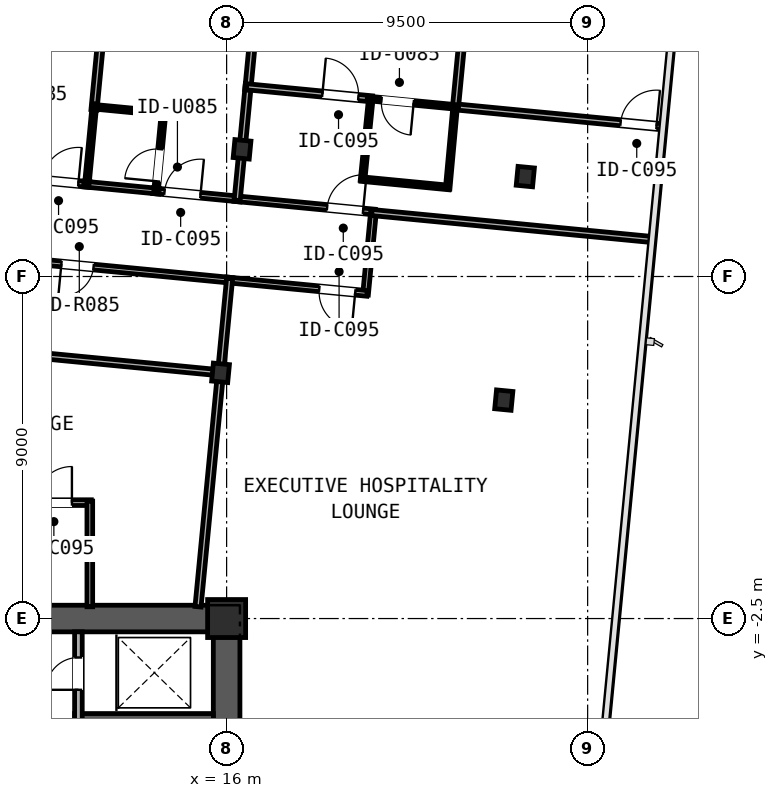
"""IFC4 building model, lengths in metres.
Left out: names, types, materials, properties, quantities, classifications, styles, units other than length and angle.
Written with IfcOpenShell. Run it as: python <this file> out.ifc"""

import sys

from ifc_helpers import new_model, si_unit, direction, frame, frame_2d, origin, origin_2d, place, context, subcontext, project, spatial, rectangle, i_section, extrude, element, fill, save


model = new_model("IFC4")
c1 = context("Model", 3, precision=1e-05, world=origin(), true_north=direction((0.0, 1.0)))
c2 = subcontext(c1, "Body", "Model", "MODEL_VIEW")
j1 = project(units=[si_unit("LENGTHUNIT", "METRE"), si_unit("PLANEANGLEUNIT", "RADIAN")], contexts=[c1])
p1 = place(None, origin())
s1 = spatial("IfcSite", under=j1, at=p1, CompositionType="ELEMENT")
p2 = place(p1, origin())
s2 = spatial("IfcBuilding", under=s1, at=p2, CompositionType="ELEMENT")
p3 = place(p2, frame((0.0, 0.0, 146.25)))
s3 = spatial("IfcBuildingStorey", under=s2, at=p3, CompositionType="ELEMENT", Elevation=146.25)
p4 = place(p3, frame((-16.35, -2.5, 0.0), z_axis=(0.0, 0.0, 1.0), x_axis=(1.0, 0.0, 0.0)))
e1 = element("IfcWall", 1, at=p4, inside=s3, PredefinedType="SHEAR", context=c2, shape_type="SweptSolid", body=[
    extrude(rectangle(XDim=32.7, YDim=0.7, at=frame_2d((16.35, 0.0))), origin(), (0.0, 0.0, 1.0), 2.91),
])
p5 = place(p4, frame((5.975, 0.0, 0.0)))
e2 = element("IfcOpeningElement", 2, at=p5, cuts=e1, PredefinedType="OPENING", context=c2, shape_type="SweptSolid", body=[
    extrude(rectangle(XDim=1.15, YDim=2.0, at=frame_2d((0.575, 1.0))), frame((0.0, 0.36, 0.0), z_axis=(0.0, -1.0, 0.0), x_axis=(1.0, 0.0, 0.0)), (0.0, 0.0, 1.0), 0.72),
])
p6 = place(p4, frame((15.55, 0.0, 0.0)))
e3 = element("IfcOpeningElement", 3, at=p6, cuts=e1, PredefinedType="OPENING", context=c2, shape_type="SweptSolid", body=[
    extrude(rectangle(XDim=1.6, YDim=2.0, at=frame_2d((0.8, 1.0))), frame((0.0, 0.36, 0.0), z_axis=(0.0, -1.0, 0.0), x_axis=(1.0, 0.0, 0.0)), (0.0, 0.0, 1.0), 0.72),
])
p7 = place(p4, frame((25.575, 0.0, 0.0)))
e4 = element("IfcOpeningElement", 4, at=p7, cuts=e1, PredefinedType="OPENING", context=c2, shape_type="SweptSolid", body=[
    extrude(rectangle(XDim=1.15, YDim=2.0, at=frame_2d((0.575, 1.0))), frame((0.0, 0.36, 0.0), z_axis=(0.0, -1.0, 0.0), x_axis=(1.0, 0.0, 0.0)), (0.0, 0.0, 1.0), 0.72),
])
p8 = place(p3, frame((16.0, -12.65, 0.0), z_axis=(0.0, 0.0, 1.0), x_axis=(0.0, 1.0, 0.0)))
e5 = element("IfcWall", 5, at=p8, inside=s3, PredefinedType="SHEAR", context=c2, shape_type="SweptSolid", body=[
    extrude(rectangle(XDim=9.8, YDim=0.7, at=frame_2d((4.9, 0.0))), origin(), (0.0, 0.0, 1.0), 2.91),
])
p9 = place(p3, frame((12.0, -5.1, 0.0), z_axis=(0.0, 0.0, 1.0), x_axis=(1.0, 0.0, 0.0)))
e6 = element("IfcWall", 6, at=p9, inside=s3, PredefinedType="SOLIDWALL", context=c2, shape_type="SweptSolid", body=[
    extrude(rectangle(XDim=3.65, YDim=0.2, at=frame_2d((1.825, 0.0))), origin(), (0.0, 0.0, 1.0), 3.19),
])
p10 = place(p3, frame((16.0, -2.5, 0.0), z_axis=(0.0, 0.0, 1.0), x_axis=(1.0, 0.0, 0.0)))
e7 = element("IfcColumn", 7, at=p10, inside=s3, PredefinedType="COLUMN", context=c2, shape_type="SweptSolid", body=[
    extrude(rectangle(XDim=1.0, YDim=1.0, at=origin_2d()), origin(), (0.0, 0.0, 1.0), 3.45),
])
for number, where, z_axis, x_axis in (
    (8, (15.84, 3.965, 0.0), (0.0, 0.0, 1.0), (0.995, -0.096, 0.0)),
    (9, (16.406, 9.846, 0.0), (0.0, 0.0, 1.0), (0.995, -0.096, 0.0)),
):
    element("IfcColumn", number, at=place(p3, frame(where, z_axis=z_axis, x_axis=x_axis)), inside=s3, PredefinedType="COLUMN", context=c2, shape_type="SweptSolid", body=[
        extrude(i_section(OverallWidth=0.424, OverallDepth=0.474, WebThickness=0.048, FlangeThickness=0.077, FilletRadius=0.031, at=origin_2d()), origin(), (0.0, 0.0, 1.0), 3.45),
    ])
for number, where, z_axis, x_axis in (
    (10, (23.293, 3.248, 0.0), (0.0, 0.0, 1.0), (0.995, -0.096, 0.0)),
    (11, (23.86, 9.128, 0.0), (0.0, 0.0, 1.0), (0.995, -0.096, 0.0)),
):
    element("IfcColumn", number, at=place(p3, frame(where, z_axis=z_axis, x_axis=x_axis)), inside=s3, PredefinedType="COLUMN", context=c2, shape_type="SweptSolid", body=[
        extrude(i_section(OverallWidth=0.432, OverallDepth=0.498, WebThickness=0.056, FlangeThickness=0.089, FilletRadius=0.031, at=origin_2d()), origin(), (0.0, 0.0, 1.0), 3.45),
    ])
p11 = place(p3, frame((12.1, -5.2, 0.0), z_axis=(0.0, 0.0, 1.0), x_axis=(0.0, 1.0, 0.0)))
e12 = element("IfcWall", 12, at=p11, inside=s3, PredefinedType="PARTITIONING", context=c2, shape_type="SweptSolid", body=[
    extrude(rectangle(XDim=2.35, YDim=0.2, at=frame_2d((1.175, 0.0))), origin(), (0.0, 0.0, 1.0), 2.225),
])
p12 = place(p11, frame((0.825, 0.0, 0.0)))
e13 = element("IfcOpeningElement", 13, at=p12, cuts=e12, PredefinedType="OPENING", context=c2, shape_type="SweptSolid", body=[
    extrude(rectangle(XDim=0.85, YDim=2.05, at=frame_2d((0.425, 1.025))), frame((0.0, 0.11, 0.0), z_axis=(0.0, -1.0, 0.0), x_axis=(1.0, 0.0, 0.0)), (0.0, 0.0, 1.0), 0.22),
])
p13 = place(p3, frame((10.101, 9.139, 0.0), z_axis=(0.0, 0.0, 1.0), x_axis=(0.995393345625, -0.095875374756, 0.0)))
e14 = element("IfcWall", 14, at=p13, inside=s3, PredefinedType="PARTITIONING", context=c2, shape_type="SweptSolid", body=[
    extrude(rectangle(XDim=2.312, YDim=0.15, at=frame_2d((1.156, 0.0))), origin(), (0.0, 0.0, 1.0), 2.718),
])
p14 = place(p13, frame((1.056, 0.0, 0.0)))
e15 = element("IfcOpeningElement", 15, at=p14, cuts=e14, PredefinedType="OPENING", context=c2, shape_type="SweptSolid", body=[
    extrude(rectangle(XDim=0.95, YDim=2.15, at=frame_2d((0.475, 1.075))), frame((0.0, 0.085, 0.0), z_axis=(0.0, -1.0, 0.0), x_axis=(1.0, 0.0, 0.0)), (0.0, 0.0, 1.0), 0.17),
])
p15 = place(p3, frame((14.061, 8.758, 0.0), z_axis=(0.0, 0.0, 1.0), x_axis=(0.995393345625, -0.095875374756, 0.0)))
e16 = element("IfcWall", 16, at=p15, inside=s3, PredefinedType="PARTITIONING", context=c2, shape_type="SweptSolid", body=[
    extrude(rectangle(XDim=2.312, YDim=0.15, at=frame_2d((1.156, 0.0))), origin(), (0.0, 0.0, 1.0), 2.479),
])
p16 = place(p15, frame((0.306, 0.0, 0.0)))
e17 = element("IfcOpeningElement", 17, at=p16, cuts=e16, PredefinedType="OPENING", context=c2, shape_type="SweptSolid", body=[
    extrude(rectangle(XDim=0.95, YDim=2.15, at=frame_2d((0.475, 1.075))), frame((0.0, 0.085, 0.0), z_axis=(0.0, -1.0, 0.0), x_axis=(1.0, 0.0, 0.0)), (0.0, 0.0, 1.0), 0.17),
])
p17 = place(p3, frame((12.24, 8.933, 0.0), z_axis=(0.0, 0.0, 1.0), x_axis=(0.995405888026, -0.095745068196, 0.0)))
e18 = element("IfcWall", 18, at=p17, inside=s3, PredefinedType="PARTITIONING", context=c2, shape_type="SweptSolid", body=[
    extrude(rectangle(XDim=1.994, YDim=0.15, at=frame_2d((0.997, 0.0))), origin(), (0.0, 0.0, 1.0), 2.718),
])
p18 = place(p3, frame((16.199, 8.552, 0.0), z_axis=(0.0, 0.0, 1.0), x_axis=(0.995391104887, -0.095898635608, 0.0)))
e19 = element("IfcWall", 19, at=p18, inside=s3, PredefinedType="PARTITIONING", context=c2, shape_type="SweptSolid", body=[
    extrude(rectangle(XDim=3.722, YDim=0.15, at=frame_2d((1.861, 0.0))), origin(), (0.0, 0.0, 1.0), 2.479),
])
p19 = place(p18, frame((2.457, 0.0, 0.0)))
e20 = element("IfcOpeningElement", 20, at=p19, cuts=e19, PredefinedType="OPENING", context=c2, shape_type="SweptSolid", body=[
    extrude(rectangle(XDim=0.95, YDim=2.15, at=frame_2d((0.475, 1.075))), frame((0.0, 0.085, 0.0), z_axis=(0.0, -1.0, 0.0), x_axis=(1.0, 0.0, 0.0)), (0.0, 0.0, 1.0), 0.17),
])
p20 = place(p3, frame((16.156, 6.396, 0.0), z_axis=(0.0, 0.0, 1.0), x_axis=(-0.99539478422, 0.095860437863, 0.0)))
e21 = element("IfcWall", 21, at=p20, inside=s3, PredefinedType="PARTITIONING", context=c2, shape_type="SweptSolid", body=[
    extrude(rectangle(XDim=10.936, YDim=0.15, at=frame_2d((5.468, 0.0))), origin(), (0.0, 0.0, 1.0), 2.479),
])
p21 = place(p20, frame((3.675, 0.0, 0.0)))
e22 = element("IfcOpeningElement", 22, at=p21, cuts=e21, PredefinedType="OPENING", context=c2, shape_type="SweptSolid", body=[
    extrude(rectangle(XDim=0.85, YDim=2.05, at=frame_2d((0.425, 1.025))), frame((0.0, 0.085, 0.0), z_axis=(0.0, -1.0, 0.0), x_axis=(1.0, 0.0, 0.0)), (0.0, 0.0, 1.0), 0.17),
])
p22 = place(p3, frame((4.607, 0.55, 0.0), z_axis=(0.0, 0.0, 1.0), x_axis=(1.0, 0.0, 0.0)))
e23 = element("IfcWall", 23, at=p22, inside=s3, PredefinedType="PARTITIONING", context=c2, shape_type="SweptSolid", body=[
    extrude(rectangle(XDim=7.833, YDim=0.15, at=frame_2d((3.917, 0.0))), origin(), (0.0, 0.0, 1.0), 2.479),
])
p23 = place(p22, frame((6.372, 0.0, 0.0)))
e24 = element("IfcOpeningElement", 24, at=p23, cuts=e23, PredefinedType="OPENING", context=c2, shape_type="SweptSolid", body=[
    extrude(rectangle(XDim=0.95, YDim=2.15, at=frame_2d((0.475, 1.075))), frame((0.0, 0.085, 0.0), z_axis=(0.0, -1.0, 0.0), x_axis=(1.0, 0.0, 0.0)), (0.0, 0.0, 1.0), 0.17),
])
p24 = place(p3, frame((12.4, 0.59, 0.0), z_axis=(0.0, 0.0, 1.0), x_axis=(0.0, -1.0, 0.0)))
e25 = element("IfcWall", 25, at=p24, inside=s3, PredefinedType="PARTITIONING", context=c2, shape_type="SweptSolid", body=[
    extrude(rectangle(XDim=2.78, YDim=0.15, at=frame_2d((1.39, 0.0))), origin(), (0.0, 0.0, 1.0), 2.225),
])
p25 = place(p3, frame((19.866, 8.219, 0.0), z_axis=(0.0, 0.0, 1.0), x_axis=(-0.095773447772, -0.995403157872, 0.0)))
e26 = element("IfcWall", 26, at=p25, inside=s3, PredefinedType="PARTITIONING", context=c2, shape_type="SweptSolid", body=[
    extrude(rectangle(XDim=2.21, YDim=0.15, at=frame_2d((1.105, 0.0))), origin(), (0.0, 0.0, 1.0), 2.718),
])
p26 = place(p3, frame((19.698, 6.055, 0.0), z_axis=(0.0, 0.0, 1.0), x_axis=(-0.995397364202, 0.095833644092, 0.0)))
e27 = element("IfcWall", 27, at=p26, inside=s3, PredefinedType="PARTITIONING", context=c2, shape_type="SweptSolid", body=[
    extrude(rectangle(XDim=3.722, YDim=0.15, at=frame_2d((1.861, 0.0))), origin(), (0.0, 0.0, 1.0), 2.479),
])
p27 = place(p26, frame((0.315, 0.0, 0.0)))
e28 = element("IfcOpeningElement", 28, at=p27, cuts=e27, PredefinedType="OPENING", context=c2, shape_type="SweptSolid", body=[
    extrude(rectangle(XDim=0.95, YDim=2.15, at=frame_2d((0.475, 1.075))), frame((0.0, 0.085, 0.0), z_axis=(0.0, -1.0, 0.0), x_axis=(1.0, 0.0, 0.0)), (0.0, 0.0, 1.0), 0.17),
])
p28 = place(p3, frame((13.481, 20.97, 0.0), z_axis=(0.0, 0.0, 1.0), x_axis=(-0.095852900965, -0.995395510024, 0.0)))
e29 = element("IfcWall", 29, at=p28, inside=s3, PredefinedType="PARTITIONING", context=c2, shape_type="SweptSolid", body=[
    extrude(rectangle(XDim=10.132, YDim=0.16, at=frame_2d((5.066, 0.0))), origin(), (0.0, 0.0, 1.0), 2.558),
])
p29 = place(p3, frame((12.526, 11.048, 0.0), z_axis=(0.0, 0.0, 1.0), x_axis=(-0.095875173929, -0.995393364969, 0.0)))
e30 = element("IfcWall", 30, at=p29, inside=s3, PredefinedType="PARTITIONING", context=c2, shape_type="SweptSolid", body=[
    extrude(rectangle(XDim=2.172, YDim=0.12, at=frame_2d((1.086, 0.0))), origin(), (0.0, 0.0, 1.0), 2.479),
])
p30 = place(p3, frame((14.139, 8.71, 0.0), z_axis=(0.0, 0.0, 1.0), x_axis=(0.095825980341, 0.995398102013, 0.0)))
e31 = element("IfcWall", 31, at=p30, inside=s3, PredefinedType="PARTITIONING", context=c2, shape_type="SweptSolid", body=[
    extrude(rectangle(XDim=2.13, YDim=0.12, at=frame_2d((1.065, 0.0))), origin(), (0.0, 0.0, 1.0), 2.479),
])
p31 = place(p30, frame((0.296, 0.0, 0.0)))
e32 = element("IfcOpeningElement", 32, at=p31, cuts=e31, PredefinedType="OPENING", context=c2, shape_type="SweptSolid", body=[
    extrude(rectangle(XDim=0.85, YDim=2.1, at=frame_2d((0.425, 1.05))), frame((0.0, 0.07, 0.0), z_axis=(0.0, -1.0, 0.0), x_axis=(1.0, 0.0, 0.0)), (0.0, 0.0, 1.0), 0.14),
])
p32 = place(p3, frame((14.379, 10.787, 0.0), z_axis=(0.0, 0.0, 1.0), x_axis=(-0.995393793358, 0.095870726213, 0.0)))
e33 = element("IfcWall", 33, at=p32, inside=s3, PredefinedType="PARTITIONING", context=c2, shape_type="SweptSolid", body=[
    extrude(rectangle(XDim=1.91, YDim=0.12, at=frame_2d((0.955, 0.0))), origin(), (0.0, 0.0, 1.0), 2.718),
])
p33 = place(p3, frame((16.389, 9.671, 0.0), z_axis=(0.0, 0.0, 1.0), x_axis=(-0.095811626391, -0.995399483749, 0.0)))
e34 = element("IfcWall", 34, at=p33, inside=s3, PredefinedType="PARTITIONING", context=c2, shape_type="SweptSolid", body=[
    extrude(rectangle(XDim=1.172, YDim=0.16, at=frame_2d((0.586, 0.0))), origin(), (0.0, 0.0, 1.0), 2.479),
])
p34 = place(p3, frame((16.572, 11.57, 0.0), z_axis=(0.0, 0.0, 1.0), x_axis=(-0.095867871334, -0.99539406832, 0.0)))
e35 = element("IfcWall", 35, at=p34, inside=s3, PredefinedType="PARTITIONING", context=c2, shape_type="SweptSolid", body=[
    extrude(rectangle(XDim=1.556, YDim=0.16, at=frame_2d((0.778, 0.0))), origin(), (0.0, 0.0, 1.0), 2.479),
])
p35 = place(p3, frame((17.098, 17.029, 0.0), z_axis=(0.0, 0.0, 1.0), x_axis=(-0.095831010877, -0.995397617716, 0.0)))
e36 = element("IfcWall", 36, at=p35, inside=s3, PredefinedType="PARTITIONING", context=c2, shape_type="SweptSolid", body=[
    extrude(rectangle(XDim=5.648, YDim=0.16, at=frame_2d((2.824, 0.0))), origin(), (0.0, 0.0, 1.0), 2.479),
])
p36 = place(p3, frame((16.525, 11.492, 0.0), z_axis=(0.0, 0.0, 1.0), x_axis=(0.995395561935, -0.095852361889, 0.0)))
e37 = element("IfcWall", 37, at=p36, inside=s3, PredefinedType="PARTITIONING", context=c2, shape_type="SweptSolid", body=[
    extrude(rectangle(XDim=3.324, YDim=0.16, at=frame_2d((1.662, 0.0))), origin(), (0.0, 0.0, 1.0), 2.479),
])
p37 = place(p36, frame((2.004, 0.0, 0.0)))
e38 = element("IfcOpeningElement", 38, at=p37, cuts=e37, PredefinedType="OPENING", context=c2, shape_type="SweptSolid", body=[
    extrude(rectangle(XDim=0.95, YDim=2.15, at=frame_2d((0.475, 1.075))), frame((0.0, 0.09, 0.0), z_axis=(0.0, -1.0, 0.0), x_axis=(1.0, 0.0, 0.0)), (0.0, 0.0, 1.0), 0.18),
])
p38 = place(p3, frame((21.973, 10.968, 0.0), z_axis=(0.0, 0.0, 1.0), x_axis=(0.99539730528, -0.095834256092, 0.0)))
e39 = element("IfcWall", 39, at=p38, inside=s3, PredefinedType="PARTITIONING", context=c2, shape_type="SweptSolid", body=[
    extrude(rectangle(XDim=5.574, YDim=0.16, at=frame_2d((2.787, 0.0))), origin(), (0.0, 0.0, 1.0), 2.558),
])
p39 = place(p38, frame((4.414, 0.0, 0.0)))
e40 = element("IfcOpeningElement", 40, at=p39, cuts=e39, PredefinedType="OPENING", context=c2, shape_type="SweptSolid", body=[
    extrude(rectangle(XDim=0.95, YDim=2.15, at=frame_2d((0.475, 1.075))), frame((0.0, 0.09, 0.0), z_axis=(0.0, -1.0, 0.0), x_axis=(1.0, 0.0, 0.0)), (0.0, 0.0, 1.0), 0.18),
])
p40 = place(p3, frame((19.798, 11.217, 0.0), z_axis=(0.0, 0.0, 1.0), x_axis=(-0.100620321887, -0.994924897077, 0.0)))
e41 = element("IfcWall", 41, at=p40, inside=s3, PredefinedType="PARTITIONING", context=c2, shape_type="SweptSolid", body=[
    extrude(rectangle(XDim=2.208, YDim=0.12, at=frame_2d((1.104, 0.0))), origin(), (0.0, 0.0, 1.0), 2.479),
])
p41 = place(p3, frame((19.54, 9.064, 0.0), z_axis=(0.0, 0.0, 1.0), x_axis=(0.995393658532, -0.095872126059, 0.0)))
e42 = element("IfcWall", 42, at=p41, inside=s3, PredefinedType="PARTITIONING", context=c2, shape_type="SweptSolid", body=[
    extrude(rectangle(XDim=2.33, YDim=0.12, at=frame_2d((1.165, 0.0))), origin(), (0.0, 0.0, 1.0), 2.718),
])
p42 = place(p3, frame((21.816, 8.805, 0.0), z_axis=(0.0, 0.0, 1.0), x_axis=(0.09110395288, 0.995841387857, 0.0)))
e43 = element("IfcWall", 43, at=p42, inside=s3, PredefinedType="PARTITIONING", context=c2, shape_type="SweptSolid", body=[
    extrude(rectangle(XDim=2.208, YDim=0.12, at=frame_2d((1.104, 0.0))), origin(), (0.0, 0.0, 1.0), 2.479),
])
p43 = place(p3, frame((27.236, 7.469, 0.0), z_axis=(0.0, 0.0, 1.0), x_axis=(-0.995396228159, 0.095845443117, 0.0)))
e44 = element("IfcWall", 44, at=p43, inside=s3, PredefinedType="PARTITIONING", context=c2, shape_type="SweptSolid", body=[
    extrude(rectangle(XDim=7.448, YDim=0.16, at=frame_2d((3.724, 0.0))), origin(), (0.0, 0.0, 1.0), 2.558),
])
p44 = place(p3, frame((22.911, 20.182, 0.0), z_axis=(0.0, 0.0, 1.0), x_axis=(-0.095851937807, -0.995395602772, 0.0)))
e45 = element("IfcWall", 45, at=p44, inside=s3, PredefinedType="PARTITIONING", context=c2, shape_type="SweptSolid", body=[
    extrude(rectangle(XDim=9.302, YDim=0.16, at=frame_2d((4.651, 0.0))), origin(), (0.0, 0.0, 1.0), 2.558),
])
p45 = place(p3, frame((22.063, 10.959, 0.0), z_axis=(0.0, 0.0, 1.0), x_axis=(-0.995398273854, 0.095824195322, 0.0)))
e46 = element("IfcWall", 46, at=p45, inside=s3, PredefinedType="PARTITIONING", context=c2, shape_type="SweptSolid", body=[
    extrude(rectangle(XDim=2.372, YDim=0.12, at=frame_2d((1.186, 0.0))), origin(), (0.0, 0.0, 1.0), 2.718),
])
p46 = place(p45, frame((1.146, 0.0, 0.0)))
e47 = element("IfcOpeningElement", 47, at=p46, cuts=e46, PredefinedType="OPENING", context=c2, shape_type="SweptSolid", body=[
    extrude(rectangle(XDim=0.85, YDim=2.1, at=frame_2d((0.425, 1.05))), frame((0.0, 0.07, 0.0), z_axis=(0.0, -1.0, 0.0), x_axis=(1.0, 0.0, 0.0)), (0.0, 0.0, 1.0), 0.14),
])
p47 = place(p3, frame((15.665, 3.982, 0.0), z_axis=(0.0, 0.0, 1.0), x_axis=(-0.995396667246, 0.095840882902, 0.0)))
e48 = element("IfcWall", 48, at=p47, inside=s3, PredefinedType="PARTITIONING", context=c2, shape_type="SweptSolid", body=[
    extrude(rectangle(XDim=7.604, YDim=0.16, at=frame_2d((3.802, 0.0))), origin(), (0.0, 0.0, 1.0), 2.479),
])
p48 = place(p3, frame((16.079, 6.444, 0.0), z_axis=(0.0, 0.0, 1.0), x_axis=(-0.095794827695, -0.995401100555, 0.0)))
e49 = element("IfcWall", 49, at=p48, inside=s3, PredefinedType="PARTITIONING", context=c2, shape_type="SweptSolid", body=[
    extrude(rectangle(XDim=2.314, YDim=0.16, at=frame_2d((1.157, 0.0))), origin(), (0.0, 0.0, 1.0), 2.479),
])
p49 = place(p3, frame((15.823, 3.79, 0.0), z_axis=(0.0, 0.0, 1.0), x_axis=(-0.095865726078, -0.99539427493, 0.0)))
e50 = element("IfcWall", 50, at=p49, inside=s3, PredefinedType="PARTITIONING", context=c2, shape_type="SweptSolid", body=[
    extrude(rectangle(XDim=6.008, YDim=0.16, at=frame_2d((3.004, 0.0))), origin(), (0.0, 0.0, 1.0), 2.225),
])
p50 = place(p12, frame((0.85, 0.0, 0.0), z_axis=(0.0, 0.0, 1.0), x_axis=(-1.0, 0.0, 0.0)))
e51 = element("IfcDoor", 51, at=p50, inside=s3, OperationType="SINGLE_SWING_LEFT", PredefinedType="DOOR", context=c2, shape_type="SweptSolid", body=[
    extrude(rectangle(XDim=0.85, YDim=2.05, at=frame_2d((0.425, 1.025))), frame((0.0, 0.025, 0.0), z_axis=(0.0, -1.0, 0.0), x_axis=(1.0, 0.0, 0.0)), (0.0, 0.0, 1.0), 0.05),
])
fill(e13, e51)
p51 = place(p14, frame((0.95, 0.0, 0.0), z_axis=(0.0, 0.0, 1.0), x_axis=(-1.0, 0.0, 0.0)))
e52 = element("IfcDoor", 52, at=p51, inside=s3, OperationType="SINGLE_SWING_RIGHT", PredefinedType="DOOR", context=c2, shape_type="SweptSolid", body=[
    extrude(rectangle(XDim=0.95, YDim=2.15, at=frame_2d((0.475, 1.075))), frame((0.0, 0.025, 0.0), z_axis=(0.0, -1.0, 0.0), x_axis=(1.0, 0.0, 0.0)), (0.0, 0.0, 1.0), 0.05),
])
fill(e15, e52)
p52 = place(p16, frame((0.95, 0.0, 0.0), z_axis=(0.0, 0.0, 1.0), x_axis=(-1.0, 0.0, 0.0)))
e53 = element("IfcDoor", 53, at=p52, inside=s3, OperationType="SINGLE_SWING_RIGHT", PredefinedType="DOOR", context=c2, shape_type="SweptSolid", body=[
    extrude(rectangle(XDim=0.95, YDim=2.15, at=frame_2d((0.475, 1.075))), frame((0.0, 0.025, 0.0), z_axis=(0.0, -1.0, 0.0), x_axis=(1.0, 0.0, 0.0)), (0.0, 0.0, 1.0), 0.05),
])
fill(e17, e53)
p53 = place(p31, origin())
e54 = element("IfcDoor", 54, at=p53, inside=s3, OperationType="SINGLE_SWING_LEFT", PredefinedType="DOOR", context=c2, shape_type="SweptSolid", body=[
    extrude(rectangle(XDim=0.85, YDim=2.1, at=frame_2d((0.425, 1.05))), frame((0.0, 0.025, 0.0), z_axis=(0.0, -1.0, 0.0), x_axis=(1.0, 0.0, 0.0)), (0.0, 0.0, 1.0), 0.05),
])
fill(e32, e54)
p54 = place(p19, frame((0.95, 0.0, 0.0), z_axis=(0.0, 0.0, 1.0), x_axis=(-1.0, 0.0, 0.0)))
e55 = element("IfcDoor", 55, at=p54, inside=s3, OperationType="SINGLE_SWING_RIGHT", PredefinedType="DOOR", context=c2, shape_type="SweptSolid", body=[
    extrude(rectangle(XDim=0.95, YDim=2.15, at=frame_2d((0.475, 1.075))), frame((0.0, 0.025, 0.0), z_axis=(0.0, -1.0, 0.0), x_axis=(1.0, 0.0, 0.0)), (0.0, 0.0, 1.0), 0.05),
])
fill(e20, e55)
p55 = place(p37, origin())
e56 = element("IfcDoor", 56, at=p55, inside=s3, OperationType="SINGLE_SWING_LEFT", PredefinedType="DOOR", context=c2, shape_type="SweptSolid", body=[
    extrude(rectangle(XDim=0.95, YDim=2.15, at=frame_2d((0.475, 1.075))), frame((0.0, 0.025, 0.0), z_axis=(0.0, -1.0, 0.0), x_axis=(1.0, 0.0, 0.0)), (0.0, 0.0, 1.0), 0.05),
])
fill(e38, e56)
p56 = place(p39, origin())
e57 = element("IfcDoor", 57, at=p56, inside=s3, OperationType="SINGLE_SWING_RIGHT", PredefinedType="DOOR", context=c2, shape_type="SweptSolid", body=[
    extrude(rectangle(XDim=0.95, YDim=2.15, at=frame_2d((0.475, 1.075))), frame((0.0, 0.025, 0.0), z_axis=(0.0, -1.0, 0.0), x_axis=(1.0, 0.0, 0.0)), (0.0, 0.0, 1.0), 0.05),
])
fill(e40, e57)
p57 = place(p46, frame((0.85, 0.0, 0.0), z_axis=(0.0, 0.0, 1.0), x_axis=(-1.0, 0.0, 0.0)))
e58 = element("IfcDoor", 58, at=p57, inside=s3, OperationType="SINGLE_SWING_LEFT", PredefinedType="DOOR", context=c2, shape_type="SweptSolid", body=[
    extrude(rectangle(XDim=0.85, YDim=2.1, at=frame_2d((0.425, 1.05))), frame((0.0, 0.025, 0.0), z_axis=(0.0, -1.0, 0.0), x_axis=(1.0, 0.0, 0.0)), (0.0, 0.0, 1.0), 0.05),
])
fill(e47, e58)
p58 = place(p21, frame((0.85, 0.0, 0.0), z_axis=(0.0, 0.0, 1.0), x_axis=(-1.0, 0.0, 0.0)))
e59 = element("IfcDoor", 59, at=p58, inside=s3, OperationType="SINGLE_SWING_RIGHT", PredefinedType="DOOR", context=c2, shape_type="SweptSolid", body=[
    extrude(rectangle(XDim=0.85, YDim=2.05, at=frame_2d((0.425, 1.025))), frame((0.0, 0.025, 0.0), z_axis=(0.0, -1.0, 0.0), x_axis=(1.0, 0.0, 0.0)), (0.0, 0.0, 1.0), 0.05),
])
fill(e22, e59)
p59 = place(p23, origin())
e60 = element("IfcDoor", 60, at=p59, inside=s3, OperationType="SINGLE_SWING_RIGHT", PredefinedType="DOOR", context=c2, shape_type="SweptSolid", body=[
    extrude(rectangle(XDim=0.95, YDim=2.15, at=frame_2d((0.475, 1.075))), frame((0.0, 0.025, 0.0), z_axis=(0.0, -1.0, 0.0), x_axis=(1.0, 0.0, 0.0)), (0.0, 0.0, 1.0), 0.05),
])
fill(e24, e60)
p60 = place(p27, frame((0.95, 0.0, 0.0), z_axis=(0.0, 0.0, 1.0), x_axis=(-1.0, 0.0, 0.0)))
e61 = element("IfcDoor", 61, at=p60, inside=s3, OperationType="SINGLE_SWING_LEFT", PredefinedType="DOOR", context=c2, shape_type="SweptSolid", body=[
    extrude(rectangle(XDim=0.95, YDim=2.15, at=frame_2d((0.475, 1.075))), frame((0.0, 0.025, 0.0), z_axis=(0.0, -1.0, 0.0), x_axis=(1.0, 0.0, 0.0)), (0.0, 0.0, 1.0), 0.05),
])
fill(e28, e61)
save(model, sys.argv[1])
